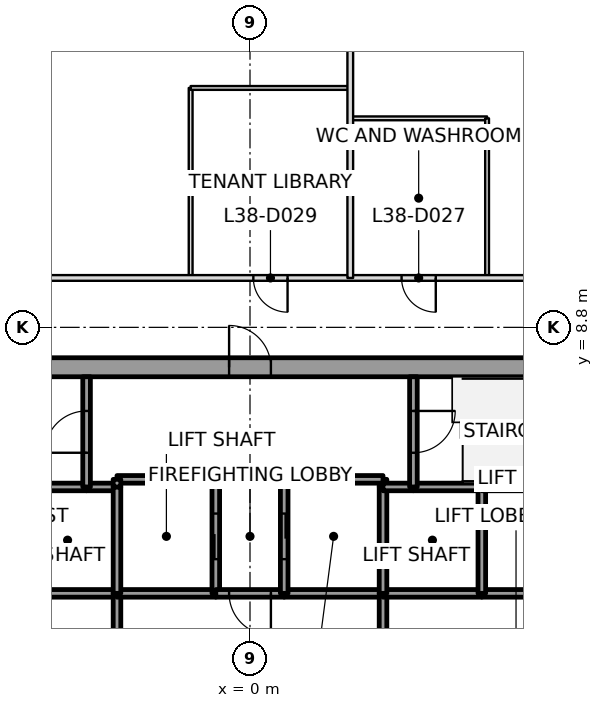
"""IFC4 building model, lengths in metres.
Left out: names, types, materials, properties, quantities, classifications, styles, units other than length and angle.
Written with IfcOpenShell. Run it as: python <this file> out.ifc"""

import sys

from ifc_helpers import new_model, si_unit, direction, frame, frame_2d, origin, place, context, subcontext, project, spatial, rectangle, extrude, element, fill, save


model = new_model("IFC4")
c1 = context("Model", 3, precision=1e-05, world=origin(), true_north=direction((0.0, 1.0)))
c2 = subcontext(c1, "Body", "Model", "MODEL_VIEW")
j1 = project(units=[si_unit("LENGTHUNIT", "METRE"), si_unit("PLANEANGLEUNIT", "RADIAN")], contexts=[c1])
p1 = place(None, origin())
s1 = spatial("IfcSite", under=j1, at=p1, CompositionType="ELEMENT")
p2 = place(p1, origin())
s2 = spatial("IfcBuilding", under=s1, at=p2, CompositionType="ELEMENT")
p3 = place(p2, frame((0.0, 0.0, 173.8)))
s3 = spatial("IfcBuildingStorey", under=s2, at=p3, CompositionType="ELEMENT", Elevation=173.8)
p4 = place(p3, frame((-11.0, 7.75, 0.0), z_axis=(0.0, 0.0, 1.0), x_axis=(1.0, 0.0, 0.0)))
e1 = element("IfcWall", 1, at=p4, inside=s3, PredefinedType="SHEAR", context=c2, shape_type="SweptSolid", body=[
    extrude(rectangle(XDim=22.0, YDim=0.5, at=frame_2d((11.0, 0.0))), origin(), (0.0, 0.0, 1.0), 4.0),
])
p5 = place(p4, frame((10.45, 0.0, 0.0)))
e2 = element("IfcOpeningElement", 2, at=p5, cuts=e1, PredefinedType="OPENING", context=c2, shape_type="SweptSolid", body=[
    extrude(rectangle(XDim=1.1, YDim=2.1, at=frame_2d((0.55, 1.05))), frame((0.0, 0.25, 0.0), z_axis=(0.0, -1.0, 0.0), x_axis=(1.0, 0.0, 0.0)), (0.0, 0.0, 1.0), 0.5),
])
p6 = place(p3, frame((-3.5, 1.8, 0.0), z_axis=(0.0, 0.0, 1.0), x_axis=(-1.0, 0.0, 0.0)))
e3 = element("IfcWall", 3, at=p6, inside=s3, PredefinedType="SOLIDWALL", context=c2, shape_type="SweptSolid", body=[
    extrude(rectangle(XDim=2.6, YDim=0.2, at=frame_2d((1.3, 0.0))), origin(), (0.0, 0.0, 1.0), 3.85),
])
p7 = place(p3, frame((-4.3, 4.6, 0.0), z_axis=(0.0, 0.0, 1.0), x_axis=(-1.0, 0.0, 0.0)))
e4 = element("IfcWall", 4, at=p7, inside=s3, PredefinedType="SOLIDWALL", context=c2, shape_type="SweptSolid", body=[
    extrude(rectangle(XDim=1.8, YDim=0.2, at=frame_2d((0.9, 0.0))), origin(), (0.0, 0.0, 1.0), 3.85),
])
p8 = place(p3, frame((-3.5, 4.6, 0.0), z_axis=(0.0, 0.0, 1.0), x_axis=(-1.0, 0.0, 0.0)))
e5 = element("IfcWall", 5, at=p8, inside=s3, PredefinedType="SOLIDWALL", context=c2, shape_type="SweptSolid", body=[
    extrude(rectangle(XDim=0.8, YDim=0.2, at=frame_2d((0.4, 0.0))), origin(), (0.0, 0.0, 1.0), 3.85),
])
p9 = place(p3, frame((-4.3, 4.6, 0.0), z_axis=(0.0, 0.0, 1.0), x_axis=(0.0, 1.0, 0.0)))
e6 = element("IfcWall", 6, at=p9, inside=s3, PredefinedType="SOLIDWALL", context=c2, shape_type="SweptSolid", body=[
    extrude(rectangle(XDim=2.9, YDim=0.2, at=frame_2d((1.45, 0.0))), origin(), (0.0, 0.0, 1.0), 3.85),
])
p10 = place(p9, frame((0.9, 0.0, 0.0)))
e7 = element("IfcOpeningElement", 7, at=p10, cuts=e6, PredefinedType="OPENING", context=c2, shape_type="SweptSolid", body=[
    extrude(rectangle(XDim=1.1, YDim=2.1, at=frame_2d((0.55, 1.05))), frame((0.0, 0.1, 0.0), z_axis=(0.0, -1.0, 0.0), x_axis=(1.0, 0.0, 0.0)), (0.0, 0.0, 1.0), 0.2),
])
p11 = place(p3, frame((-3.5, 1.8, 0.0), z_axis=(0.0, 0.0, 1.0), x_axis=(0.0, -1.0, 0.0)))
e8 = element("IfcWall", 8, at=p11, inside=s3, PredefinedType="SOLIDWALL", context=c2, shape_type="SweptSolid", body=[
    extrude(rectangle(XDim=3.6, YDim=0.2, at=frame_2d((1.8, 0.0))), origin(), (0.0, 0.0, 1.0), 3.85),
])
p12 = place(p11, frame((1.05, 0.0, 0.0)))
e9 = element("IfcOpeningElement", 9, at=p12, cuts=e8, PredefinedType="OPENING", context=c2, shape_type="SweptSolid", body=[
    extrude(rectangle(XDim=1.5, YDim=2.1, at=frame_2d((0.75, 1.05))), frame((0.0, 0.1, 0.0), z_axis=(0.0, -1.0, 0.0), x_axis=(1.0, 0.0, 0.0)), (0.0, 0.0, 1.0), 0.2),
])
p13 = place(p3, frame((-0.9, 1.8, 0.0), z_axis=(0.0, 0.0, 1.0), x_axis=(-1.0, 0.0, 0.0)))
e10 = element("IfcWall", 10, at=p13, inside=s3, PredefinedType="SOLIDWALL", context=c2, shape_type="SweptSolid", body=[
    extrude(rectangle(XDim=2.6, YDim=0.2, at=frame_2d((1.3, 0.0))), origin(), (0.0, 0.0, 1.0), 3.85),
])
p14 = place(p3, frame((-3.5, 4.6, 0.0), z_axis=(0.0, 0.0, 1.0), x_axis=(0.0, -1.0, 0.0)))
e11 = element("IfcWall", 11, at=p14, inside=s3, PredefinedType="SOLIDWALL", context=c2, shape_type="SweptSolid", body=[
    extrude(rectangle(XDim=2.8, YDim=0.2, at=frame_2d((1.4, 0.0))), origin(), (0.0, 0.0, 1.0), 3.85),
])
p15 = place(p3, frame((-0.9, 1.8, 0.0), z_axis=(0.0, 0.0, 1.0), x_axis=(0.0, 1.0, 0.0)))
e12 = element("IfcWall", 12, at=p15, inside=s3, PredefinedType="SOLIDWALL", context=c2, shape_type="SweptSolid", body=[
    extrude(rectangle(XDim=3.0, YDim=0.2, at=frame_2d((1.5, 0.0))), origin(), (0.0, 0.0, 1.0), 3.85),
])
p16 = place(p15, frame((0.9, 0.0, 0.0)))
e13 = element("IfcOpeningElement", 13, at=p16, cuts=e12, PredefinedType="OPENING", context=c2, shape_type="SweptSolid", body=[
    extrude(rectangle(XDim=1.2, YDim=2.1, at=frame_2d((0.6, 1.05))), frame((0.0, 0.1, 0.0), z_axis=(0.0, -1.0, 0.0), x_axis=(1.0, 0.0, 0.0)), (0.0, 0.0, 1.0), 0.2),
])
p17 = place(p3, frame((-0.9, 4.8, 0.0), z_axis=(0.0, 0.0, 1.0), x_axis=(-1.0, 0.0, 0.0)))
e14 = element("IfcWall", 14, at=p17, inside=s3, PredefinedType="SOLIDWALL", context=c2, shape_type="SweptSolid", body=[
    extrude(rectangle(XDim=2.6, YDim=0.2, at=frame_2d((1.3, 0.0))), origin(), (0.0, 0.0, 1.0), 3.85),
])
p18 = place(p3, frame((-3.5, 4.8, 0.0), z_axis=(0.0, 0.0, 1.0), x_axis=(0.0, -1.0, 0.0)))
e15 = element("IfcWall", 15, at=p18, inside=s3, PredefinedType="SOLIDWALL", context=c2, shape_type="SweptSolid", body=[
    extrude(rectangle(XDim=0.2, YDim=0.2, at=frame_2d((0.1, 0.0))), origin(), (0.0, 0.0, 1.0), 3.85),
])
p19 = place(p3, frame((0.9, 1.8, 0.0), z_axis=(0.0, 0.0, 1.0), x_axis=(-1.0, 0.0, 0.0)))
e16 = element("IfcWall", 16, at=p19, inside=s3, PredefinedType="SOLIDWALL", context=c2, shape_type="SweptSolid", body=[
    extrude(rectangle(XDim=1.8, YDim=0.2, at=frame_2d((0.9, 0.0))), origin(), (0.0, 0.0, 1.0), 3.85),
])
p20 = place(p19, frame((0.35, 0.0, 0.0)))
e17 = element("IfcOpeningElement", 17, at=p20, cuts=e16, PredefinedType="OPENING", context=c2, shape_type="SweptSolid", body=[
    extrude(rectangle(XDim=1.1, YDim=2.1, at=frame_2d((0.55, 1.05))), frame((0.0, 0.1, 0.0), z_axis=(0.0, -1.0, 0.0), x_axis=(1.0, 0.0, 0.0)), (0.0, 0.0, 1.0), 0.2),
])
p21 = place(p3, frame((3.5, 1.8, 0.0), z_axis=(0.0, 0.0, 1.0), x_axis=(-1.0, 0.0, 0.0)))
e18 = element("IfcWall", 18, at=p21, inside=s3, PredefinedType="SOLIDWALL", context=c2, shape_type="SweptSolid", body=[
    extrude(rectangle(XDim=2.6, YDim=0.2, at=frame_2d((1.3, 0.0))), origin(), (0.0, 0.0, 1.0), 3.85),
])
p22 = place(p3, frame((3.5, 4.6, 0.0), z_axis=(0.0, 0.0, 1.0), x_axis=(0.0, 1.0, 0.0)))
e19 = element("IfcWall", 19, at=p22, inside=s3, PredefinedType="SOLIDWALL", context=c2, shape_type="SweptSolid", body=[
    extrude(rectangle(XDim=0.2, YDim=0.2, at=frame_2d((0.1, 0.0))), origin(), (0.0, 0.0, 1.0), 3.85),
])
p23 = place(p3, frame((3.5, 4.8, 0.0), z_axis=(0.0, 0.0, 1.0), x_axis=(-1.0, 0.0, 0.0)))
e20 = element("IfcWall", 20, at=p23, inside=s3, PredefinedType="SOLIDWALL", context=c2, shape_type="SweptSolid", body=[
    extrude(rectangle(XDim=2.6, YDim=0.2, at=frame_2d((1.3, 0.0))), origin(), (0.0, 0.0, 1.0), 3.85),
])
p24 = place(p3, frame((0.9, 4.8, 0.0), z_axis=(0.0, 0.0, 1.0), x_axis=(0.0, -1.0, 0.0)))
e21 = element("IfcWall", 21, at=p24, inside=s3, PredefinedType="SOLIDWALL", context=c2, shape_type="SweptSolid", body=[
    extrude(rectangle(XDim=3.0, YDim=0.2, at=frame_2d((1.5, 0.0))), origin(), (0.0, 0.0, 1.0), 3.85),
])
p25 = place(p24, frame((0.9, 0.0, 0.0)))
e22 = element("IfcOpeningElement", 22, at=p25, cuts=e21, PredefinedType="OPENING", context=c2, shape_type="SweptSolid", body=[
    extrude(rectangle(XDim=1.2, YDim=2.1, at=frame_2d((0.6, 1.05))), frame((0.0, 0.1, 0.0), z_axis=(0.0, -1.0, 0.0), x_axis=(1.0, 0.0, 0.0)), (0.0, 0.0, 1.0), 0.2),
])
p26 = place(p3, frame((3.5, -1.8, 0.0), z_axis=(0.0, 0.0, 1.0), x_axis=(0.0, 1.0, 0.0)))
e23 = element("IfcWall", 23, at=p26, inside=s3, PredefinedType="SOLIDWALL", context=c2, shape_type="SweptSolid", body=[
    extrude(rectangle(XDim=3.6, YDim=0.2, at=frame_2d((1.8, 0.0))), origin(), (0.0, 0.0, 1.0), 3.85),
])
p27 = place(p26, frame((1.05, 0.0, 0.0)))
e24 = element("IfcOpeningElement", 24, at=p27, cuts=e23, PredefinedType="OPENING", context=c2, shape_type="SweptSolid", body=[
    extrude(rectangle(XDim=1.5, YDim=2.1, at=frame_2d((0.75, 1.05))), frame((0.0, 0.1, 0.0), z_axis=(0.0, -1.0, 0.0), x_axis=(1.0, 0.0, 0.0)), (0.0, 0.0, 1.0), 0.2),
])
p28 = place(p3, frame((6.1, 1.8, 0.0), z_axis=(0.0, 0.0, 1.0), x_axis=(-1.0, 0.0, 0.0)))
e25 = element("IfcWall", 25, at=p28, inside=s3, PredefinedType="SOLIDWALL", context=c2, shape_type="SweptSolid", body=[
    extrude(rectangle(XDim=2.6, YDim=0.2, at=frame_2d((1.3, 0.0))), origin(), (0.0, 0.0, 1.0), 3.85),
])
p29 = place(p3, frame((3.5, 1.8, 0.0), z_axis=(0.0, 0.0, 1.0), x_axis=(0.0, 1.0, 0.0)))
e26 = element("IfcWall", 26, at=p29, inside=s3, PredefinedType="SOLIDWALL", context=c2, shape_type="SweptSolid", body=[
    extrude(rectangle(XDim=2.8, YDim=0.2, at=frame_2d((1.4, 0.0))), origin(), (0.0, 0.0, 1.0), 3.85),
])
p30 = place(p3, frame((4.3, 4.6, 0.0), z_axis=(0.0, 0.0, 1.0), x_axis=(-1.0, 0.0, 0.0)))
e27 = element("IfcWall", 27, at=p30, inside=s3, PredefinedType="SOLIDWALL", context=c2, shape_type="SweptSolid", body=[
    extrude(rectangle(XDim=0.8, YDim=0.2, at=frame_2d((0.4, 0.0))), origin(), (0.0, 0.0, 1.0), 3.85),
])
p31 = place(p3, frame((6.1, 4.6, 0.0), z_axis=(0.0, 0.0, 1.0), x_axis=(-1.0, 0.0, 0.0)))
e28 = element("IfcWall", 28, at=p31, inside=s3, PredefinedType="SOLIDWALL", context=c2, shape_type="SweptSolid", body=[
    extrude(rectangle(XDim=1.8, YDim=0.2, at=frame_2d((0.9, 0.0))), origin(), (0.0, 0.0, 1.0), 3.85),
])
p32 = place(p3, frame((4.3, 7.5, 0.0), z_axis=(0.0, 0.0, 1.0), x_axis=(0.0, -1.0, 0.0)))
e29 = element("IfcWall", 29, at=p32, inside=s3, PredefinedType="SOLIDWALL", context=c2, shape_type="SweptSolid", body=[
    extrude(rectangle(XDim=2.9, YDim=0.2, at=frame_2d((1.45, 0.0))), origin(), (0.0, 0.0, 1.0), 3.85),
])
p33 = place(p32, frame((0.9, 0.0, 0.0)))
e30 = element("IfcOpeningElement", 30, at=p33, cuts=e29, PredefinedType="OPENING", context=c2, shape_type="SweptSolid", body=[
    extrude(rectangle(XDim=1.1, YDim=2.1, at=frame_2d((0.55, 1.05))), frame((0.0, 0.1, 0.0), z_axis=(0.0, -1.0, 0.0), x_axis=(1.0, 0.0, 0.0)), (0.0, 0.0, 1.0), 0.2),
])
p34 = place(p3, frame((8.7, 1.8, 0.0), z_axis=(0.0, 0.0, 1.0), x_axis=(-1.0, 0.0, 0.0)))
e31 = element("IfcWall", 31, at=p34, inside=s3, PredefinedType="SOLIDWALL", context=c2, shape_type="SweptSolid", body=[
    extrude(rectangle(XDim=2.6, YDim=0.2, at=frame_2d((1.3, 0.0))), origin(), (0.0, 0.0, 1.0), 3.85),
])
p35 = place(p3, frame((6.1, 1.8, 0.0), z_axis=(0.0, 0.0, 1.0), x_axis=(0.0, 1.0, 0.0)))
e32 = element("IfcWall", 32, at=p35, inside=s3, PredefinedType="SOLIDWALL", context=c2, shape_type="SweptSolid", body=[
    extrude(rectangle(XDim=2.8, YDim=0.2, at=frame_2d((1.4, 0.0))), origin(), (0.0, 0.0, 1.0), 3.85),
])
p36 = place(p3, frame((8.7, 4.6, 0.0), z_axis=(0.0, 0.0, 1.0), x_axis=(-1.0, 0.0, 0.0)))
e33 = element("IfcWall", 33, at=p36, inside=s3, PredefinedType="SOLIDWALL", context=c2, shape_type="SweptSolid", body=[
    extrude(rectangle(XDim=2.6, YDim=0.2, at=frame_2d((1.3, 0.0))), origin(), (0.0, 0.0, 1.0), 3.85),
])
p37 = place(p3, frame((2.638, 10.1, 0.0), z_axis=(0.0, 0.0, 1.0), x_axis=(0.0, 1.0, 0.0)))
e34 = element("IfcWall", 34, at=p37, inside=s3, PredefinedType="PARTITIONING", context=c2, shape_type="SweptSolid", body=[
    extrude(rectangle(XDim=13.711, YDim=0.15, at=frame_2d((6.856, 0.0))), origin(), (0.0, 0.0, 1.0), 3.247),
])
p38 = place(p3, frame((13.02, 10.1, 0.0), z_axis=(0.0, 0.0, 1.0), x_axis=(-1.0, 0.0, 0.0)))
e35 = element("IfcWall", 35, at=p38, inside=s3, PredefinedType="PARTITIONING", context=c2, shape_type="SweptSolid", body=[
    extrude(rectangle(XDim=25.382, YDim=0.15, at=frame_2d((12.691, 0.0))), origin(), (0.0, 0.0, 1.0), 3.166),
])
p39 = place(p38, frame((8.132, 0.0, 0.0)))
e36 = element("IfcOpeningElement", 36, at=p39, cuts=e35, PredefinedType="OPENING", context=c2, shape_type="SweptSolid", body=[
    extrude(rectangle(XDim=0.9, YDim=2.1, at=frame_2d((0.45, 1.05))), frame((0.0, 0.075, 0.0), z_axis=(0.0, -1.0, 0.0), x_axis=(1.0, 0.0, 0.0)), (0.0, 0.0, 1.0), 0.15),
])
p40 = place(p38, frame((2.791, 0.0, 0.0)))
e37 = element("IfcOpeningElement", 37, at=p40, cuts=e35, PredefinedType="OPENING", context=c2, shape_type="SweptSolid", body=[
    extrude(rectangle(XDim=1.0, YDim=2.1, at=frame_2d((0.5, 1.05))), frame((0.0, 0.075, 0.0), z_axis=(0.0, -1.0, 0.0), x_axis=(1.0, 0.0, 0.0)), (0.0, 0.0, 1.0), 0.15),
])
p41 = place(p38, frame((12.032, 0.0, 0.0)))
e38 = element("IfcOpeningElement", 38, at=p41, cuts=e35, PredefinedType="OPENING", context=c2, shape_type="SweptSolid", body=[
    extrude(rectangle(XDim=0.9, YDim=2.1, at=frame_2d((0.45, 1.05))), frame((0.0, 0.075, 0.0), z_axis=(0.0, -1.0, 0.0), x_axis=(1.0, 0.0, 0.0)), (0.0, 0.0, 1.0), 0.15),
])
p42 = place(p38, frame((19.532, 0.0, 0.0)))
e39 = element("IfcOpeningElement", 39, at=p42, cuts=e35, PredefinedType="OPENING", context=c2, shape_type="SweptSolid", body=[
    extrude(rectangle(XDim=1.0, YDim=2.1, at=frame_2d((0.5, 1.05))), frame((0.0, 0.075, 0.0), z_axis=(0.0, -1.0, 0.0), x_axis=(1.0, 0.0, 0.0)), (0.0, 0.0, 1.0), 0.15),
])
p43 = place(p3, frame((-1.562, 10.13, 0.0), z_axis=(0.0, 0.0, 1.0), x_axis=(0.0, 1.0, 0.0)))
e40 = element("IfcWall", 40, at=p43, inside=s3, PredefinedType="PARTITIONING", context=c2, shape_type="SweptSolid", body=[
    extrude(rectangle(XDim=4.97, YDim=0.1, at=frame_2d((2.485, 0.0))), origin(), (0.0, 0.0, 1.0), 3.247),
])
p44 = place(p3, frame((-1.562, 15.1, 0.0), z_axis=(0.0, 0.0, 1.0), x_axis=(1.0, 0.0, 0.0)))
e41 = element("IfcWall", 41, at=p44, inside=s3, PredefinedType="PARTITIONING", context=c2, shape_type="SweptSolid", body=[
    extrude(rectangle(XDim=4.17, YDim=0.1, at=frame_2d((2.085, 0.0))), origin(), (0.0, 0.0, 1.0), 3.166),
])
p45 = place(p3, frame((2.668, 14.3, 0.0), z_axis=(0.0, 0.0, 1.0), x_axis=(1.0, 0.0, 0.0)))
e42 = element("IfcWall", 42, at=p45, inside=s3, PredefinedType="PARTITIONING", context=c2, shape_type="SweptSolid", body=[
    extrude(rectangle(XDim=3.57, YDim=0.1, at=frame_2d((1.785, 0.0))), origin(), (0.0, 0.0, 1.0), 3.247),
])
p46 = place(p3, frame((6.238, 14.3, 0.0), z_axis=(0.0, 0.0, 1.0), x_axis=(0.0, -1.0, 0.0)))
e43 = element("IfcWall", 43, at=p46, inside=s3, PredefinedType="PARTITIONING", context=c2, shape_type="SweptSolid", body=[
    extrude(rectangle(XDim=4.17, YDim=0.1, at=frame_2d((2.085, 0.0))), origin(), (0.0, 0.0, 1.0), 3.247),
])
p47 = place(p39, origin())
e44 = element("IfcDoor", 44, at=p47, inside=s3, OperationType="SINGLE_SWING_LEFT", PredefinedType="DOOR", context=c2, shape_type="SweptSolid", body=[
    extrude(rectangle(XDim=0.9, YDim=2.1, at=frame_2d((0.45, 1.05))), frame((0.0, 0.025, 0.0), z_axis=(0.0, -1.0, 0.0), x_axis=(1.0, 0.0, 0.0)), (0.0, 0.0, 1.0), 0.05),
])
fill(e36, e44)
p48 = place(p41, origin())
e45 = element("IfcDoor", 45, at=p48, inside=s3, OperationType="SINGLE_SWING_LEFT", PredefinedType="DOOR", context=c2, shape_type="SweptSolid", body=[
    extrude(rectangle(XDim=0.9, YDim=2.1, at=frame_2d((0.45, 1.05))), frame((0.0, 0.025, 0.0), z_axis=(0.0, -1.0, 0.0), x_axis=(1.0, 0.0, 0.0)), (0.0, 0.0, 1.0), 0.05),
])
fill(e38, e45)
p49 = place(p16, origin())
e46 = element("IfcDoor", 46, at=p49, inside=s3, OperationType="SLIDING_TO_LEFT", PredefinedType="DOOR", context=c2, shape_type="SweptSolid", body=[
    extrude(rectangle(XDim=1.2, YDim=2.1, at=frame_2d((0.6, 1.05))), frame((0.0, 0.025, 0.0), z_axis=(0.0, -1.0, 0.0), x_axis=(1.0, 0.0, 0.0)), (0.0, 0.0, 1.0), 0.05),
])
fill(e13, e46)
p50 = place(p25, origin())
e47 = element("IfcDoor", 47, at=p50, inside=s3, OperationType="SLIDING_TO_LEFT", PredefinedType="DOOR", context=c2, shape_type="SweptSolid", body=[
    extrude(rectangle(XDim=1.2, YDim=2.1, at=frame_2d((0.6, 1.05))), frame((0.0, 0.025, 0.0), z_axis=(0.0, -1.0, 0.0), x_axis=(1.0, 0.0, 0.0)), (0.0, 0.0, 1.0), 0.05),
])
fill(e22, e47)
p51 = place(p20, origin())
e48 = element("IfcDoor", 48, at=p51, inside=s3, OperationType="SINGLE_SWING_RIGHT", PredefinedType="DOOR", context=c2, shape_type="SweptSolid", body=[
    extrude(rectangle(XDim=1.1, YDim=2.1, at=frame_2d((0.55, 1.05))), frame((0.0, 0.025, 0.0), z_axis=(0.0, -1.0, 0.0), x_axis=(1.0, 0.0, 0.0)), (0.0, 0.0, 1.0), 0.05),
])
fill(e17, e48)
p52 = place(p10, origin())
e49 = element("IfcDoor", 49, at=p52, inside=s3, OperationType="SINGLE_SWING_LEFT", PredefinedType="DOOR", context=c2, shape_type="SweptSolid", body=[
    extrude(rectangle(XDim=1.1, YDim=2.1, at=frame_2d((0.55, 1.05))), frame((0.0, 0.025, 0.0), z_axis=(0.0, -1.0, 0.0), x_axis=(1.0, 0.0, 0.0)), (0.0, 0.0, 1.0), 0.05),
])
fill(e7, e49)
p53 = place(p33, origin())
e50 = element("IfcDoor", 50, at=p53, inside=s3, OperationType="SINGLE_SWING_RIGHT", PredefinedType="DOOR", context=c2, shape_type="SweptSolid", body=[
    extrude(rectangle(XDim=1.1, YDim=2.1, at=frame_2d((0.55, 1.05))), frame((0.0, 0.025, 0.0), z_axis=(0.0, -1.0, 0.0), x_axis=(1.0, 0.0, 0.0)), (0.0, 0.0, 1.0), 0.05),
])
fill(e30, e50)
p54 = place(p5, origin())
e51 = element("IfcDoor", 51, at=p54, inside=s3, OperationType="SINGLE_SWING_RIGHT", PredefinedType="DOOR", context=c2, shape_type="SweptSolid", body=[
    extrude(rectangle(XDim=1.1, YDim=2.1, at=frame_2d((0.55, 1.05))), frame((0.0, 0.025, 0.0), z_axis=(0.0, -1.0, 0.0), x_axis=(1.0, 0.0, 0.0)), (0.0, 0.0, 1.0), 0.05),
])
fill(e2, e51)
save(model, sys.argv[1])
